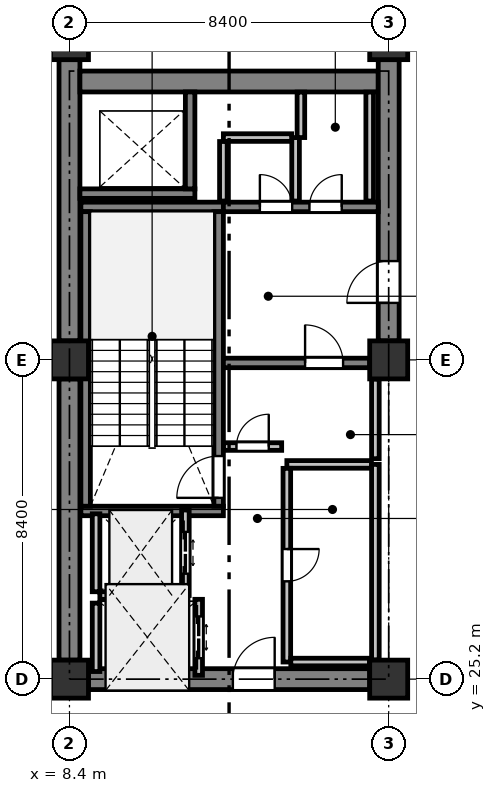
"""IFC4 building model, lengths in metres.
Left out: names, types, materials, properties, quantities, classifications, styles, units other than length and angle.
Written with IfcOpenShell. Run it as: python <this file> out.ifc"""

import sys

from ifc_helpers import new_model, si_unit, direction, frame, frame_2d, origin, origin_2d, place, context, subcontext, project, spatial, rectangle, extrude, element, fill, save


model = new_model("IFC4")
c1 = context("Model", 3, precision=1e-05, world=origin(), true_north=direction((0.0, 1.0)))
c2 = subcontext(c1, "Body", "Model", "MODEL_VIEW")
j1 = project(units=[si_unit("LENGTHUNIT", "METRE"), si_unit("PLANEANGLEUNIT", "RADIAN")], contexts=[c1])
p1 = place(None, origin())
s1 = spatial("IfcSite", under=j1, at=p1, CompositionType="ELEMENT")
p2 = place(p1, origin())
s2 = spatial("IfcBuilding", under=s1, at=p2, CompositionType="ELEMENT")
p3 = place(p2, frame((0.0, 0.0, 220.6)))
s3 = spatial("IfcBuildingStorey", under=s2, at=p3, CompositionType="ELEMENT", Elevation=220.6)
for number, where, z_axis, x_axis in (
    (1, (8.4, 25.2, 0.0), (0.0, 0.0, 1.0), (1.0, 0.0, 0.0)),
    (2, (8.4, 33.6, 0.0), (0.0, 0.0, 1.0), (1.0, 0.0, 0.0)),
    (3, (8.4, 42.0, 0.0), (0.0, 0.0, 1.0), (1.0, 0.0, 0.0)),
    (4, (16.8, 25.2, 0.0), (0.0, 0.0, 1.0), (1.0, 0.0, 0.0)),
    (5, (16.8, 33.6, 0.0), (0.0, 0.0, 1.0), (1.0, 0.0, 0.0)),
    (6, (16.8, 42.0, 0.0), (0.0, 0.0, 1.0), (1.0, 0.0, 0.0)),
):
    element("IfcColumn", number, at=place(p3, frame(where, z_axis=z_axis, x_axis=x_axis)), inside=s3, PredefinedType="COLUMN", context=c2, shape_type="SweptSolid", body=[
        extrude(rectangle(XDim=1.0, YDim=1.0, at=origin_2d()), origin(), (0.0, 0.0, 1.0), 4.1),
    ])
p4 = place(p3, frame((8.4, 25.7, 0.0), z_axis=(0.0, 0.0, 1.0), x_axis=(0.0, 1.0, 0.0)))
e7 = element("IfcWall", 7, at=p4, inside=s3, PredefinedType="SHEAR", context=c2, shape_type="SweptSolid", body=[
    extrude(rectangle(XDim=7.4, YDim=0.55, at=frame_2d((3.7, 0.0))), origin(), (0.0, 0.0, 1.0), 3.825),
])
p5 = place(p3, frame((8.4, 34.1, 0.0), z_axis=(0.0, 0.0, 1.0), x_axis=(0.0, 1.0, 0.0)))
e8 = element("IfcWall", 8, at=p5, inside=s3, PredefinedType="SHEAR", context=c2, shape_type="SweptSolid", body=[
    extrude(rectangle(XDim=7.4, YDim=0.55, at=frame_2d((3.7, 0.0))), origin(), (0.0, 0.0, 1.0), 3.825),
])
p6 = place(p3, frame((8.675, 40.925, 0.0), z_axis=(0.0, 0.0, 1.0), x_axis=(1.0, 0.0, 0.0)))
e9 = element("IfcWall", 9, at=p6, inside=s3, PredefinedType="SHEAR", context=c2, shape_type="SweptSolid", body=[
    extrude(rectangle(XDim=7.85, YDim=0.55, at=frame_2d((3.925, 0.0))), origin(), (0.0, 0.0, 1.0), 3.825),
])
p7 = place(p3, frame((16.8, 34.1, 0.0), z_axis=(0.0, 0.0, 1.0), x_axis=(0.0, 1.0, 0.0)))
e10 = element("IfcWall", 10, at=p7, inside=s3, PredefinedType="SHEAR", context=c2, shape_type="SweptSolid", body=[
    extrude(rectangle(XDim=7.4, YDim=0.55, at=frame_2d((3.7, 0.0))), origin(), (0.0, 0.0, 1.0), 3.825),
])
p8 = place(p7, frame((1.0, 0.0, 0.0)))
e11 = element("IfcOpeningElement", 11, at=p8, cuts=e10, PredefinedType="OPENING", context=c2, shape_type="SweptSolid", body=[
    extrude(rectangle(XDim=1.1, YDim=2.15, at=frame_2d((0.55, 1.075))), frame((0.0, 0.285, 0.0), z_axis=(0.0, -1.0, 0.0), x_axis=(1.0, 0.0, 0.0)), (0.0, 0.0, 1.0), 0.57),
])
p9 = place(p3, frame((8.9, 25.2, 0.0), z_axis=(0.0, 0.0, 1.0), x_axis=(1.0, 0.0, 0.0)))
e12 = element("IfcWall", 12, at=p9, inside=s3, PredefinedType="SHEAR", context=c2, shape_type="SweptSolid", body=[
    extrude(rectangle(XDim=7.4, YDim=0.55, at=frame_2d((3.7, 0.0))), origin(), (0.0, 0.0, 1.0), 3.825),
])
p10 = place(p9, frame((3.8, 0.0, 0.0)))
e13 = element("IfcOpeningElement", 13, at=p10, cuts=e12, PredefinedType="OPENING", context=c2, shape_type="SweptSolid", body=[
    extrude(rectangle(XDim=1.1, YDim=2.15, at=frame_2d((0.55, 1.075))), frame((0.0, 0.285, 0.0), z_axis=(0.0, -1.0, 0.0), x_axis=(1.0, 0.0, 0.0)), (0.0, 0.0, 1.0), 0.57),
])
for number, where, z_axis, x_axis in (
    (14, (12.45, 29.625, 0.0), (0.0, 0.0, 1.0), (-1.0, 0.0, 0.0)),
    (15, (12.45, 37.625, 0.0), (0.0, 0.0, 1.0), (-1.0, 0.0, 0.0)),
):
    element("IfcWall", number, at=place(p3, frame(where, z_axis=z_axis, x_axis=x_axis)), inside=s3, PredefinedType="SHEAR", context=c2, shape_type="SweptSolid", body=[
        extrude(rectangle(XDim=3.75, YDim=0.25, at=frame_2d((1.875, 0.0))), origin(), (0.0, 0.0, 1.0), 3.825),
    ])
p11 = place(p3, frame((12.325, 29.75, 0.0), z_axis=(0.0, 0.0, 1.0), x_axis=(0.0, 1.0, 0.0)))
e16 = element("IfcWall", 16, at=p11, inside=s3, PredefinedType="SHEAR", context=c2, shape_type="SweptSolid", body=[
    extrude(rectangle(XDim=7.75, YDim=0.25, at=frame_2d((3.875, 0.0))), origin(), (0.0, 0.0, 1.0), 3.825),
])
p12 = place(p11, frame((0.22, 0.0, 0.0)))
e17 = element("IfcOpeningElement", 17, at=p12, cuts=e16, PredefinedType="OPENING", context=c2, shape_type="SweptSolid", body=[
    extrude(rectangle(XDim=1.1, YDim=2.15, at=frame_2d((0.55, 1.075))), frame((0.0, 0.135, 0.0), z_axis=(0.0, -1.0, 0.0), x_axis=(1.0, 0.0, 0.0)), (0.0, 0.0, 1.0), 0.27),
])
p13 = place(p3, frame((8.825, 29.75, 0.0), z_axis=(0.0, 0.0, 1.0), x_axis=(0.0, 1.0, 0.0)))
e18 = element("IfcWall", 18, at=p13, inside=s3, PredefinedType="SHEAR", context=c2, shape_type="SweptSolid", body=[
    extrude(rectangle(XDim=7.75, YDim=0.25, at=frame_2d((3.875, 0.0))), origin(), (0.0, 0.0, 1.0), 3.825),
])
p14 = place(p3, frame((8.675, 37.975, 0.0), z_axis=(0.0, 0.0, 1.0), x_axis=(1.0, 0.0, 0.0)))
e19 = element("IfcWall", 19, at=p14, inside=s3, PredefinedType="SHEAR", context=c2, shape_type="SweptSolid", body=[
    extrude(rectangle(XDim=3.025, YDim=0.25, at=frame_2d((1.512, 0.0))), origin(), (0.0, 0.0, 1.0), 3.825),
])
p15 = place(p3, frame((11.575, 38.1, 0.0), z_axis=(0.0, 0.0, 1.0), x_axis=(0.0, 1.0, 0.0)))
e20 = element("IfcWall", 20, at=p15, inside=s3, PredefinedType="SHEAR", context=c2, shape_type="SweptSolid", body=[
    extrude(rectangle(XDim=2.55, YDim=0.25, at=frame_2d((1.275, 0.0))), origin(), (0.0, 0.0, 1.0), 3.825),
])
p16 = place(p3, frame((12.45, 33.52, 0.0), z_axis=(0.0, 0.0, 1.0), x_axis=(1.0, 0.0, 0.0)))
e21 = element("IfcWall", 21, at=p16, inside=s3, PredefinedType="SHEAR", context=c2, shape_type="SweptSolid", body=[
    extrude(rectangle(XDim=3.85, YDim=0.25, at=frame_2d((1.925, 0.0))), origin(), (0.0, 0.0, 1.0), 3.825),
])
p17 = place(p16, frame((2.15, 0.0, 0.0)))
e22 = element("IfcOpeningElement", 22, at=p17, cuts=e21, PredefinedType="OPENING", context=c2, shape_type="SweptSolid", body=[
    extrude(rectangle(XDim=1.0, YDim=2.15, at=frame_2d((0.5, 1.075))), frame((0.0, 0.135, 0.0), z_axis=(0.0, -1.0, 0.0), x_axis=(1.0, 0.0, 0.0)), (0.0, 0.0, 1.0), 0.27),
])
p18 = place(p3, frame((12.45, 37.625, 0.0), z_axis=(0.0, 0.0, 1.0), x_axis=(1.0, 0.0, 0.0)))
e23 = element("IfcWall", 23, at=p18, inside=s3, PredefinedType="SHEAR", context=c2, shape_type="SweptSolid", body=[
    extrude(rectangle(XDim=4.075, YDim=0.25, at=frame_2d((2.038, 0.0))), origin(), (0.0, 0.0, 1.0), 3.825),
])
p19 = place(p18, frame((0.96, 0.0, 0.0)))
e24 = element("IfcOpeningElement", 24, at=p19, cuts=e23, PredefinedType="OPENING", context=c2, shape_type="SweptSolid", body=[
    extrude(rectangle(XDim=0.85, YDim=2.15, at=frame_2d((0.425, 1.075))), frame((0.0, 0.135, 0.0), z_axis=(0.0, -1.0, 0.0), x_axis=(1.0, 0.0, 0.0)), (0.0, 0.0, 1.0), 0.27),
])
p20 = place(p18, frame((2.264, 0.0, 0.0)))
e25 = element("IfcOpeningElement", 25, at=p20, cuts=e23, PredefinedType="OPENING", context=c2, shape_type="SweptSolid", body=[
    extrude(rectangle(XDim=0.85, YDim=2.15, at=frame_2d((0.425, 1.075))), frame((0.0, 0.135, 0.0), z_axis=(0.0, -1.0, 0.0), x_axis=(1.0, 0.0, 0.0)), (0.0, 0.0, 1.0), 0.27),
])
p21 = place(p3, frame((11.45, 27.4, 0.0), z_axis=(0.0, 0.0, 1.0), x_axis=(0.0, 1.0, 0.0)))
e26 = element("IfcWall", 26, at=p21, inside=s3, PredefinedType="PARTITIONING", context=c2, shape_type="SweptSolid", body=[
    extrude(rectangle(XDim=2.25, YDim=0.2, at=frame_2d((1.125, 0.0))), origin(), (0.0, 0.0, 1.0), 3.825),
])
p22 = place(p21, frame((0.575, 0.0, 0.0)))
e27 = element("IfcOpeningElement", 27, at=p22, cuts=e26, PredefinedType="OPENING", context=c2, shape_type="SweptSolid", body=[
    extrude(rectangle(XDim=1.1, YDim=2.2, at=frame_2d((0.55, 1.1))), frame((0.0, 0.11, 0.0), z_axis=(0.0, -1.0, 0.0), x_axis=(1.0, 0.0, 0.0)), (0.0, 0.0, 1.0), 0.22),
])
p23 = place(p3, frame((9.1, 27.5, 0.0), z_axis=(0.0, 0.0, 1.0), x_axis=(0.0, 1.0, 0.0)))
e28 = element("IfcWall", 28, at=p23, inside=s3, PredefinedType="PARTITIONING", context=c2, shape_type="SweptSolid", body=[
    extrude(rectangle(XDim=2.05, YDim=0.2, at=frame_2d((1.025, 0.0))), origin(), (0.0, 0.0, 1.0), 3.825),
])
p24 = place(p3, frame((9.2, 27.4, 0.0), z_axis=(0.0, 0.0, 1.0), x_axis=(1.0, 0.0, 0.0)))
e29 = element("IfcWall", 29, at=p24, inside=s3, PredefinedType="PARTITIONING", context=c2, shape_type="SweptSolid", body=[
    extrude(rectangle(XDim=2.15, YDim=0.2, at=frame_2d((1.075, 0.0))), origin(), (0.0, 0.0, 1.0), 3.825),
])
p25 = place(p3, frame((11.8, 25.3, 0.0), z_axis=(0.0, 0.0, 1.0), x_axis=(0.0, 1.0, 0.0)))
e30 = element("IfcWall", 30, at=p25, inside=s3, PredefinedType="PARTITIONING", context=c2, shape_type="SweptSolid", body=[
    extrude(rectangle(XDim=2.0, YDim=0.2, at=frame_2d((1.0, 0.0))), origin(), (0.0, 0.0, 1.0), 3.825),
])
p26 = place(p25, frame((0.45, 0.0, 0.0)))
e31 = element("IfcOpeningElement", 31, at=p26, cuts=e30, PredefinedType="OPENING", context=c2, shape_type="SweptSolid", body=[
    extrude(rectangle(XDim=1.1, YDim=2.2, at=frame_2d((0.55, 1.1))), frame((0.0, 0.11, 0.0), z_axis=(0.0, -1.0, 0.0), x_axis=(1.0, 0.0, 0.0)), (0.0, 0.0, 1.0), 0.22),
])
p27 = place(p3, frame((9.1, 25.4, 0.0), z_axis=(0.0, 0.0, 1.0), x_axis=(0.0, 1.0, 0.0)))
e32 = element("IfcWall", 32, at=p27, inside=s3, PredefinedType="PARTITIONING", context=c2, shape_type="SweptSolid", body=[
    extrude(rectangle(XDim=1.8, YDim=0.2, at=frame_2d((0.9, 0.0))), origin(), (0.0, 0.0, 1.0), 3.825),
])
p28 = place(p3, frame((16.45, 25.705, 0.0), z_axis=(0.0, 0.0, 1.0), x_axis=(0.0, 1.0, 0.0)))
e33 = element("IfcWall", 33, at=p28, inside=s3, PredefinedType="PARTITIONING", context=c2, shape_type="SweptSolid", body=[
    extrude(rectangle(XDim=5.145, YDim=0.2, at=frame_2d((2.573, 0.0))), origin(), (0.0, 0.0, 1.0), 3.825),
])
p29 = place(p3, frame((16.346, 30.85, 0.0), z_axis=(0.0, 0.0, 1.0), x_axis=(-1.0, 0.0, 0.0)))
e34 = element("IfcWall", 34, at=p29, inside=s3, PredefinedType="PARTITIONING", context=c2, shape_type="SweptSolid", body=[
    extrude(rectangle(XDim=2.226, YDim=0.2, at=frame_2d((1.113, 0.0))), origin(), (0.0, 0.0, 1.0), 3.825),
])
p30 = place(p3, frame((14.12, 30.746, 0.0), z_axis=(0.0, 0.0, 1.0), x_axis=(0.0, -1.0, 0.0)))
e35 = element("IfcWall", 35, at=p30, inside=s3, PredefinedType="PARTITIONING", context=c2, shape_type="SweptSolid", body=[
    extrude(rectangle(XDim=5.096, YDim=0.2, at=frame_2d((2.548, 0.0))), origin(), (0.0, 0.0, 1.0), 3.825),
])
p31 = place(p30, frame((2.123, 0.0, 0.0)))
e36 = element("IfcOpeningElement", 36, at=p31, cuts=e35, PredefinedType="OPENING", context=c2, shape_type="SweptSolid", body=[
    extrude(rectangle(XDim=0.85, YDim=2.15, at=frame_2d((0.425, 1.075))), frame((0.0, 0.11, 0.0), z_axis=(0.0, -1.0, 0.0), x_axis=(1.0, 0.0, 0.0)), (0.0, 0.0, 1.0), 0.22),
])
p32 = place(p3, frame((14.224, 25.65, 0.0), z_axis=(0.0, 0.0, 1.0), x_axis=(1.0, 0.0, 0.0)))
e37 = element("IfcWall", 37, at=p32, inside=s3, PredefinedType="PARTITIONING", context=c2, shape_type="SweptSolid", body=[
    extrude(rectangle(XDim=2.071, YDim=0.2, at=frame_2d((1.035, 0.0))), origin(), (0.0, 0.0, 1.0), 3.825),
])
p33 = place(p3, frame((12.454, 31.32, 0.0), z_axis=(0.0, 0.0, 1.0), x_axis=(0.999999949061, -0.000319182876, 0.0)))
e38 = element("IfcWall", 38, at=p33, inside=s3, PredefinedType="PARTITIONING", context=c2, shape_type="SweptSolid", body=[
    extrude(rectangle(XDim=1.53, YDim=0.2, at=frame_2d((0.765, 0.0))), origin(), (0.0, 0.0, 1.0), 3.825),
])
p34 = place(p33, frame((0.34, 0.0, 0.0)))
e39 = element("IfcOpeningElement", 39, at=p34, cuts=e38, PredefinedType="OPENING", context=c2, shape_type="SweptSolid", body=[
    extrude(rectangle(XDim=0.85, YDim=2.15, at=frame_2d((0.425, 1.075))), frame((0.0, 0.11, 0.0), z_axis=(0.0, -1.0, 0.0), x_axis=(1.0, 0.0, 0.0)), (0.0, 0.0, 1.0), 0.22),
])
p35 = place(p3, frame((16.45, 31.0, 0.0), z_axis=(0.0, 0.0, 1.0), x_axis=(0.0, 1.0, 0.0)))
e40 = element("IfcWall", 40, at=p35, inside=s3, PredefinedType="PARTITIONING", context=c2, shape_type="SweptSolid", body=[
    extrude(rectangle(XDim=2.095, YDim=0.2, at=frame_2d((1.047, 0.0))), origin(), (0.0, 0.0, 1.0), 3.825),
])
p36 = place(p3, frame((14.35, 37.78, 0.0), z_axis=(0.0, 0.0, 1.0), x_axis=(0.0, 1.0, 0.0)))
e41 = element("IfcWall", 41, at=p36, inside=s3, PredefinedType="PARTITIONING", context=c2, shape_type="SweptSolid", body=[
    extrude(rectangle(XDim=1.67, YDim=0.2, at=frame_2d((0.835, 0.0))), origin(), (0.0, 0.0, 1.0), 2.875),
])
p37 = place(p3, frame((14.246, 39.45, 0.0), z_axis=(0.0, 0.0, 1.0), x_axis=(-1.0, 0.0, 0.0)))
e42 = element("IfcWall", 42, at=p37, inside=s3, PredefinedType="PARTITIONING", context=c2, shape_type="SweptSolid", body=[
    extrude(rectangle(XDim=1.796, YDim=0.2, at=frame_2d((0.898, 0.0))), origin(), (0.0, 0.0, 1.0), 2.875),
])
p38 = place(p3, frame((12.45, 39.346, 0.0), z_axis=(0.0, 0.0, 1.0), x_axis=(0.0, -1.0, 0.0)))
e43 = element("IfcWall", 43, at=p38, inside=s3, PredefinedType="PARTITIONING", context=c2, shape_type="SweptSolid", body=[
    extrude(rectangle(XDim=1.566, YDim=0.2, at=frame_2d((0.783, 0.0))), origin(), (0.0, 0.0, 1.0), 2.875),
])
p39 = place(p3, frame((16.3, 37.78, 0.0), z_axis=(0.0, 0.0, 1.0), x_axis=(0.0, 1.0, 0.0)))
e44 = element("IfcWall", 44, at=p39, inside=s3, PredefinedType="PARTITIONING", context=c2, shape_type="SweptSolid", body=[
    extrude(rectangle(XDim=2.866, YDim=0.2, at=frame_2d((1.433, 0.0))), origin(), (0.0, 0.0, 1.0), 2.875),
])
p40 = place(p3, frame((14.49, 40.646, 0.0), z_axis=(0.0, 0.0, 1.0), x_axis=(0.0, -1.0, 0.0)))
e45 = element("IfcWall", 45, at=p40, inside=s3, PredefinedType="PARTITIONING", context=c2, shape_type="SweptSolid", body=[
    extrude(rectangle(XDim=1.196, YDim=0.2, at=frame_2d((0.598, 0.0))), origin(), (0.0, 0.0, 1.0), 2.875),
])
p41 = place(p8, origin())
e46 = element("IfcDoor", 46, at=p41, inside=s3, OperationType="SINGLE_SWING_LEFT", PredefinedType="DOOR", context=c2, shape_type="SweptSolid", body=[
    extrude(rectangle(XDim=1.1, YDim=2.15, at=frame_2d((0.55, 1.075))), frame((0.0, 0.025, 0.0), z_axis=(0.0, -1.0, 0.0), x_axis=(1.0, 0.0, 0.0)), (0.0, 0.0, 1.0), 0.05),
])
fill(e11, e46)
p42 = place(p10, origin())
e47 = element("IfcDoor", 47, at=p42, inside=s3, OperationType="SINGLE_SWING_RIGHT", PredefinedType="DOOR", context=c2, shape_type="SweptSolid", body=[
    extrude(rectangle(XDim=1.1, YDim=2.15, at=frame_2d((0.55, 1.075))), frame((0.0, 0.025, 0.0), z_axis=(0.0, -1.0, 0.0), x_axis=(1.0, 0.0, 0.0)), (0.0, 0.0, 1.0), 0.05),
])
fill(e13, e47)
p43 = place(p12, origin())
e48 = element("IfcDoor", 48, at=p43, inside=s3, OperationType="SINGLE_SWING_LEFT", PredefinedType="DOOR", context=c2, shape_type="SweptSolid", body=[
    extrude(rectangle(XDim=1.1, YDim=2.15, at=frame_2d((0.55, 1.075))), frame((0.0, 0.025, 0.0), z_axis=(0.0, -1.0, 0.0), x_axis=(1.0, 0.0, 0.0)), (0.0, 0.0, 1.0), 0.05),
])
fill(e17, e48)
p44 = place(p17, origin())
e49 = element("IfcDoor", 49, at=p44, inside=s3, OperationType="SINGLE_SWING_LEFT", PredefinedType="DOOR", context=c2, shape_type="SweptSolid", body=[
    extrude(rectangle(XDim=1.0, YDim=2.15, at=frame_2d((0.5, 1.075))), frame((0.0, 0.025, 0.0), z_axis=(0.0, -1.0, 0.0), x_axis=(1.0, 0.0, 0.0)), (0.0, 0.0, 1.0), 0.05),
])
fill(e22, e49)
p45 = place(p22, origin())
e50 = element("IfcDoor", 50, at=p45, inside=s3, OperationType="DOUBLE_DOOR_SLIDING", PredefinedType="DOOR", context=c2, shape_type="SweptSolid", body=[
    extrude(rectangle(XDim=1.1, YDim=2.2, at=frame_2d((0.55, 1.1))), frame((0.0, 0.025, 0.0), z_axis=(0.0, -1.0, 0.0), x_axis=(1.0, 0.0, 0.0)), (0.0, 0.0, 1.0), 0.05),
])
fill(e27, e50)
p46 = place(p26, origin())
e51 = element("IfcDoor", 51, at=p46, inside=s3, OperationType="DOUBLE_DOOR_SLIDING", PredefinedType="DOOR", context=c2, shape_type="SweptSolid", body=[
    extrude(rectangle(XDim=1.1, YDim=2.2, at=frame_2d((0.55, 1.1))), frame((0.0, 0.025, 0.0), z_axis=(0.0, -1.0, 0.0), x_axis=(1.0, 0.0, 0.0)), (0.0, 0.0, 1.0), 0.05),
])
fill(e31, e51)
p47 = place(p31, origin())
e52 = element("IfcDoor", 52, at=p47, inside=s3, OperationType="SINGLE_SWING_LEFT", PredefinedType="DOOR", context=c2, shape_type="SweptSolid", body=[
    extrude(rectangle(XDim=0.85, YDim=2.15, at=frame_2d((0.425, 1.075))), frame((0.0, 0.025, 0.0), z_axis=(0.0, -1.0, 0.0), x_axis=(1.0, 0.0, 0.0)), (0.0, 0.0, 1.0), 0.05),
])
fill(e36, e52)
p48 = place(p34, origin())
e53 = element("IfcDoor", 53, at=p48, inside=s3, OperationType="SINGLE_SWING_RIGHT", PredefinedType="DOOR", context=c2, shape_type="SweptSolid", body=[
    extrude(rectangle(XDim=0.85, YDim=2.15, at=frame_2d((0.425, 1.075))), frame((0.0, 0.025, 0.0), z_axis=(0.0, -1.0, 0.0), x_axis=(1.0, 0.0, 0.0)), (0.0, 0.0, 1.0), 0.05),
])
fill(e39, e53)
p49 = place(p19, origin())
e54 = element("IfcDoor", 54, at=p49, inside=s3, OperationType="SINGLE_SWING_LEFT", PredefinedType="DOOR", context=c2, shape_type="SweptSolid", body=[
    extrude(rectangle(XDim=0.85, YDim=2.15, at=frame_2d((0.425, 1.075))), frame((0.0, 0.025, 0.0), z_axis=(0.0, -1.0, 0.0), x_axis=(1.0, 0.0, 0.0)), (0.0, 0.0, 1.0), 0.05),
])
fill(e24, e54)
p50 = place(p20, origin())
e55 = element("IfcDoor", 55, at=p50, inside=s3, OperationType="SINGLE_SWING_RIGHT", PredefinedType="DOOR", context=c2, shape_type="SweptSolid", body=[
    extrude(rectangle(XDim=0.85, YDim=2.15, at=frame_2d((0.425, 1.075))), frame((0.0, 0.025, 0.0), z_axis=(0.0, -1.0, 0.0), x_axis=(1.0, 0.0, 0.0)), (0.0, 0.0, 1.0), 0.05),
])
fill(e25, e55)
save(model, sys.argv[1])
